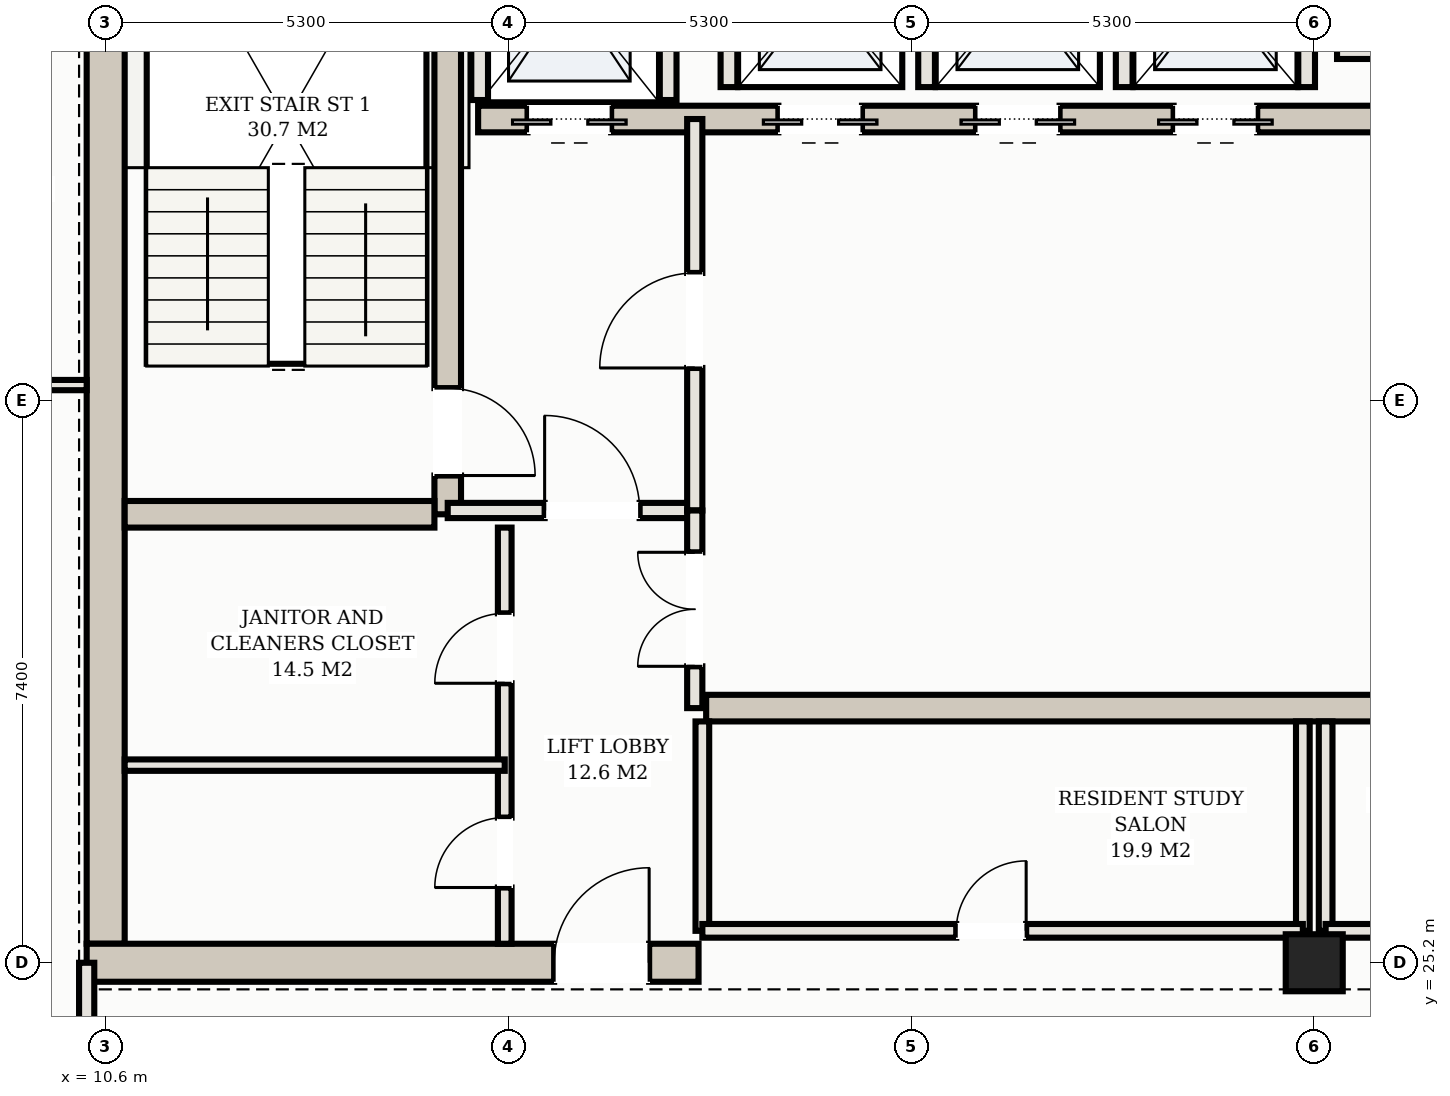
"""IFC4 building model, lengths in metres.
Left out: names, types, materials, properties, quantities, classifications, styles, units other than length and angle.
Written with IfcOpenShell. Run it as: python <this file> out.ifc"""

import sys

from ifc_helpers import new_model, si_unit, direction, frame, frame_2d, origin, origin_2d, place, context, subcontext, project, spatial, rectangle, hollow_rectangle, extrude, element, fill, save


model = new_model("IFC4")
c1 = context("Model", 3, precision=1e-05, world=origin(), true_north=direction((0.0, 1.0)))
c2 = subcontext(c1, "Body", "Model", "MODEL_VIEW")
j1 = project(units=[si_unit("LENGTHUNIT", "METRE"), si_unit("PLANEANGLEUNIT", "RADIAN")], contexts=[c1])
p1 = place(None, origin())
s1 = spatial("IfcSite", under=j1, at=p1, CompositionType="ELEMENT")
p2 = place(p1, origin())
s2 = spatial("IfcBuilding", under=s1, at=p2, CompositionType="ELEMENT")
p3 = place(p2, frame((0.0, 0.0, 219.8)))
s3 = spatial("IfcBuildingStorey", under=s2, at=p3, CompositionType="ELEMENT", Elevation=219.8)
p4 = place(p3, frame((10.6, 25.45, 0.0), z_axis=(0.0, 0.0, 1.0), x_axis=(0.0, 1.0, 0.0)))
e1 = element("IfcWall", 1, at=p4, inside=s3, PredefinedType="SHEAR", context=c2, shape_type="SweptSolid", body=[
    extrude(rectangle(XDim=14.3, YDim=0.5, at=frame_2d((7.15, 0.0))), origin(), (0.0, 0.0, 1.0), 3.11),
])
p5 = place(p3, frame((10.35, 25.2, 0.0), z_axis=(0.0, 0.0, 1.0), x_axis=(1.0, 0.0, 0.0)))
e2 = element("IfcWall", 2, at=p5, inside=s3, PredefinedType="SHEAR", context=c2, shape_type="SweptSolid", body=[
    extrude(rectangle(XDim=8.05, YDim=0.5, at=frame_2d((4.025, 0.0))), origin(), (0.0, 0.0, 1.0), 3.11),
])
p6 = place(p5, frame((6.15, 0.0, 0.0)))
e3 = element("IfcOpeningElement", 3, at=p6, cuts=e2, PredefinedType="OPENING", context=c2, shape_type="SweptSolid", body=[
    extrude(rectangle(XDim=1.25, YDim=2.2, at=frame_2d((0.625, 1.1))), frame((0.0, 0.26, 0.0), z_axis=(0.0, -1.0, 0.0), x_axis=(1.0, 0.0, 0.0)), (0.0, 0.0, 1.0), 0.52),
])
p7 = place(p3, frame((15.1, 31.1, 0.0), z_axis=(0.0, 0.0, 1.0), x_axis=(0.0, 1.0, 0.0)))
e4 = element("IfcWall", 4, at=p7, inside=s3, PredefinedType="SHEAR", context=c2, shape_type="SweptSolid", body=[
    extrude(rectangle(XDim=8.65, YDim=0.35, at=frame_2d((4.325, 0.0))), origin(), (0.0, 0.0, 1.0), 3.11),
])
p8 = place(p7, frame((0.51, 0.0, 0.0)))
e5 = element("IfcOpeningElement", 5, at=p8, cuts=e4, PredefinedType="OPENING", context=c2, shape_type="SweptSolid", body=[
    extrude(rectangle(XDim=1.15, YDim=2.2, at=frame_2d((0.575, 1.1))), frame((0.0, 0.185, 0.0), z_axis=(0.0, -1.0, 0.0), x_axis=(1.0, 0.0, 0.0)), (0.0, 0.0, 1.0), 0.37),
])
p9 = place(p3, frame((10.85, 31.1, 0.0), z_axis=(0.0, 0.0, 1.0), x_axis=(1.0, 0.0, 0.0)))
e6 = element("IfcWall", 6, at=p9, inside=s3, PredefinedType="SHEAR", context=c2, shape_type="SweptSolid", body=[
    extrude(rectangle(XDim=4.075, YDim=0.35, at=frame_2d((2.038, 0.0))), origin(), (0.0, 0.0, 1.0), 3.11),
])
p10 = place(p3, frame((15.5, 36.3, 0.0), z_axis=(0.0, 0.0, 1.0), x_axis=(1.0, 0.0, 0.0)))
e7 = element("IfcWall", 7, at=p10, inside=s3, PredefinedType="SHEAR", context=c2, shape_type="SweptSolid", body=[
    extrude(rectangle(XDim=22.0, YDim=0.35, at=frame_2d((11.0, 0.0))), origin(), (0.0, 0.0, 1.0), 3.11),
])
p11 = place(p10, frame((0.65, 0.0, 0.0)))
e8 = element("IfcOpeningElement", 8, at=p11, cuts=e7, PredefinedType="OPENING", context=c2, shape_type="SweptSolid", body=[
    extrude(rectangle(XDim=1.1, YDim=2.15, at=frame_2d((0.55, 1.075))), frame((0.0, 0.185, 0.0), z_axis=(0.0, -1.0, 0.0), x_axis=(1.0, 0.0, 0.0)), (0.0, 0.0, 1.0), 0.37),
])
p12 = place(p10, frame((20.25, 0.0, 0.0)))
e9 = element("IfcOpeningElement", 9, at=p12, cuts=e7, PredefinedType="OPENING", context=c2, shape_type="SweptSolid", body=[
    extrude(rectangle(XDim=1.1, YDim=2.15, at=frame_2d((0.55, 1.075))), frame((0.0, 0.185, 0.0), z_axis=(0.0, -1.0, 0.0), x_axis=(1.0, 0.0, 0.0)), (0.0, 0.0, 1.0), 0.37),
])
p13 = place(p10, frame((17.05, 0.0, 0.0)))
e10 = element("IfcOpeningElement", 10, at=p13, cuts=e7, PredefinedType="OPENING", context=c2, shape_type="SweptSolid", body=[
    extrude(rectangle(XDim=1.3, YDim=2.2, at=frame_2d((0.65, 1.1))), frame((0.0, 0.185, 0.0), z_axis=(0.0, -1.0, 0.0), x_axis=(1.0, 0.0, 0.0)), (0.0, 0.0, 1.0), 0.37),
])
p14 = place(p10, frame((3.95, 0.0, 0.0)))
e11 = element("IfcOpeningElement", 11, at=p14, cuts=e7, PredefinedType="OPENING", context=c2, shape_type="SweptSolid", body=[
    extrude(rectangle(XDim=1.1, YDim=2.15, at=frame_2d((0.55, 1.075))), frame((0.0, 0.185, 0.0), z_axis=(0.0, -1.0, 0.0), x_axis=(1.0, 0.0, 0.0)), (0.0, 0.0, 1.0), 0.37),
])
p15 = place(p10, frame((6.55, 0.0, 0.0)))
e12 = element("IfcOpeningElement", 12, at=p15, cuts=e7, PredefinedType="OPENING", context=c2, shape_type="SweptSolid", body=[
    extrude(rectangle(XDim=1.1, YDim=2.15, at=frame_2d((0.55, 1.075))), frame((0.0, 0.185, 0.0), z_axis=(0.0, -1.0, 0.0), x_axis=(1.0, 0.0, 0.0)), (0.0, 0.0, 1.0), 0.37),
])
p16 = place(p10, frame((9.15, 0.0, 0.0)))
e13 = element("IfcOpeningElement", 13, at=p16, cuts=e7, PredefinedType="OPENING", context=c2, shape_type="SweptSolid", body=[
    extrude(rectangle(XDim=1.1, YDim=2.15, at=frame_2d((0.55, 1.075))), frame((0.0, 0.185, 0.0), z_axis=(0.0, -1.0, 0.0), x_axis=(1.0, 0.0, 0.0)), (0.0, 0.0, 1.0), 0.37),
])
p17 = place(p3, frame((18.5, 28.55, 0.0), z_axis=(0.0, 0.0, 1.0), x_axis=(1.0, 0.0, 0.0)))
e14 = element("IfcWall", 14, at=p17, inside=s3, PredefinedType="SHEAR", context=c2, shape_type="SweptSolid", body=[
    extrude(rectangle(XDim=16.0, YDim=0.35, at=frame_2d((8.0, 0.0))), origin(), (0.0, 0.0, 1.0), 3.11),
])
p18 = place(p3, frame((26.5, 25.2, 0.0), z_axis=(0.0, 0.0, 1.0), x_axis=(1.0, 0.0, 0.0)))
e15 = element("IfcColumn", 15, at=p18, inside=s3, PredefinedType="COLUMN", context=c2, shape_type="SweptSolid", body=[
    extrude(hollow_rectangle(XDim=0.75, YDim=0.75, WallThickness=0.025, at=origin_2d()), origin(), (0.0, 0.0, 1.0), 3.3),
])
for number, where, z_axis, x_axis in (
    (16, (15.52, 36.55, 0.0), (0.0, 0.0, 1.0), (0.0, 1.0, 0.0)),
    (17, (18.0, 36.55, 0.0), (0.0, 0.0, 1.0), (0.0, 1.0, 0.0)),
):
    element("IfcWall", number, at=place(p3, frame(where, z_axis=z_axis, x_axis=x_axis)), inside=s3, PredefinedType="SOLIDWALL", context=c2, shape_type="SweptSolid", body=[
        extrude(rectangle(XDim=2.93, YDim=0.22, at=frame_2d((1.465, 0.0))), origin(), (0.0, 0.0, 1.0), 3.11),
    ])
for number, where, z_axis, x_axis in (
    (18, (18.8, 36.72, 0.0), (0.0, 0.0, 1.0), (0.0, 1.0, 0.0)),
    (19, (21.4, 36.72, 0.0), (0.0, 0.0, 1.0), (0.0, 1.0, 0.0)),
    (20, (24.0, 36.72, 0.0), (0.0, 0.0, 1.0), (0.0, 1.0, 0.0)),
    (21, (26.4, 36.72, 0.0), (0.0, 0.0, 1.0), (0.0, 1.0, 0.0)),
):
    element("IfcWall", number, at=place(p3, frame(where, z_axis=z_axis, x_axis=x_axis)), inside=s3, PredefinedType="SOLIDWALL", context=c2, shape_type="SweptSolid", body=[
        extrude(rectangle(XDim=2.56, YDim=0.22, at=frame_2d((1.28, 0.0))), origin(), (0.0, 0.0, 1.0), 3.11),
    ])
p19 = place(p3, frame((26.8, 37.2, 0.0), z_axis=(0.0, 0.0, 1.0), x_axis=(1.0, 0.0, 0.0)))
e22 = element("IfcWall", 22, at=p19, inside=s3, PredefinedType="SOLIDWALL", context=c2, shape_type="SweptSolid", body=[
    extrude(rectangle(XDim=2.2, YDim=0.22, at=frame_2d((1.1, 0.0))), origin(), (0.0, 0.0, 1.0), 3.11),
])
p20 = place(p3, frame((15.1, 31.15, 0.0), z_axis=(0.0, 0.0, 1.0), x_axis=(1.0, 0.0, 0.0)))
e23 = element("IfcWall", 23, at=p20, inside=s3, PredefinedType="PARTITIONING", context=c2, shape_type="SweptSolid", body=[
    extrude(rectangle(XDim=3.25, YDim=0.2, at=frame_2d((1.625, 0.0))), origin(), (0.0, 0.0, 1.0), 2.43),
])
p21 = place(p20, frame((1.275, 0.0, 0.0)))
e24 = element("IfcOpeningElement", 24, at=p21, cuts=e23, PredefinedType="OPENING", context=c2, shape_type="SweptSolid", body=[
    extrude(rectangle(XDim=1.25, YDim=2.2, at=frame_2d((0.625, 1.1))), frame((0.0, 0.11, 0.0), z_axis=(0.0, -1.0, 0.0), x_axis=(1.0, 0.0, 0.0)), (0.0, 0.0, 1.0), 0.22),
])
p22 = place(p3, frame((18.35, 31.15, 0.0), z_axis=(0.0, 0.0, 1.0), x_axis=(0.0, 1.0, 0.0)))
e25 = element("IfcWall", 25, at=p22, inside=s3, PredefinedType="PARTITIONING", context=c2, shape_type="SweptSolid", body=[
    extrude(rectangle(XDim=5.15, YDim=0.2, at=frame_2d((2.575, 0.0))), origin(), (0.0, 0.0, 1.0), 2.43),
])
p23 = place(p22, frame((1.875, 0.0, 0.0)))
e26 = element("IfcOpeningElement", 26, at=p23, cuts=e25, PredefinedType="OPENING", context=c2, shape_type="SweptSolid", body=[
    extrude(rectangle(XDim=1.25, YDim=2.2, at=frame_2d((0.625, 1.1))), frame((0.0, 0.11, 0.0), z_axis=(0.0, -1.0, 0.0), x_axis=(1.0, 0.0, 0.0)), (0.0, 0.0, 1.0), 0.22),
])
p24 = place(p3, frame((15.85, 25.45, 0.0), z_axis=(0.0, 0.0, 1.0), x_axis=(0.0, 1.0, 0.0)))
e27 = element("IfcWall", 27, at=p24, inside=s3, PredefinedType="PARTITIONING", context=c2, shape_type="SweptSolid", body=[
    extrude(rectangle(XDim=5.475, YDim=0.18, at=frame_2d((2.738, 0.0))), origin(), (0.0, 0.0, 1.0), 2.43),
])
p25 = place(p24, frame((0.74, 0.0, 0.0)))
e28 = element("IfcOpeningElement", 28, at=p25, cuts=e27, PredefinedType="OPENING", context=c2, shape_type="SweptSolid", body=[
    extrude(rectangle(XDim=0.92, YDim=2.15, at=frame_2d((0.46, 1.075))), frame((0.0, 0.1, 0.0), z_axis=(0.0, -1.0, 0.0), x_axis=(1.0, 0.0, 0.0)), (0.0, 0.0, 1.0), 0.2),
])
p26 = place(p24, frame((3.427, 0.0, 0.0)))
e29 = element("IfcOpeningElement", 29, at=p26, cuts=e27, PredefinedType="OPENING", context=c2, shape_type="SweptSolid", body=[
    extrude(rectangle(XDim=0.92, YDim=2.15, at=frame_2d((0.46, 1.075))), frame((0.0, 0.1, 0.0), z_axis=(0.0, -1.0, 0.0), x_axis=(1.0, 0.0, 0.0)), (0.0, 0.0, 1.0), 0.2),
])
p27 = place(p3, frame((10.85, 27.8, 0.0), z_axis=(0.0, 0.0, 1.0), x_axis=(1.0, 0.0, 0.0)))
e30 = element("IfcWall", 30, at=p27, inside=s3, PredefinedType="PARTITIONING", context=c2, shape_type="SweptSolid", body=[
    extrude(rectangle(XDim=5.0, YDim=0.15, at=frame_2d((2.5, 0.0))), origin(), (0.0, 0.0, 1.0), 2.43),
])
p28 = place(p3, frame((18.35, 28.55, 0.0), z_axis=(0.0, 0.0, 1.0), x_axis=(0.0, 1.0, 0.0)))
e31 = element("IfcWall", 31, at=p28, inside=s3, PredefinedType="PARTITIONING", context=c2, shape_type="SweptSolid", body=[
    extrude(rectangle(XDim=2.6, YDim=0.2, at=frame_2d((1.3, 0.0))), origin(), (0.0, 0.0, 1.0), 2.43),
])
p29 = place(p28, frame((0.55, 0.0, 0.0)))
e32 = element("IfcOpeningElement", 32, at=p29, cuts=e31, PredefinedType="OPENING", context=c2, shape_type="SweptSolid", body=[
    extrude(rectangle(XDim=1.5, YDim=2.25, at=frame_2d((0.75, 1.125))), frame((0.0, 0.11, 0.0), z_axis=(0.0, -1.0, 0.0), x_axis=(1.0, 0.0, 0.0)), (0.0, 0.0, 1.0), 0.22),
])
for number, where, z_axis, x_axis in (
    (33, (18.45, 25.62, 0.0), (0.0, 0.0, 1.0), (0.0, 1.0, 0.0)),
    (34, (26.35, 25.62, 0.0), (0.0, 0.0, 1.0), (0.0, 1.0, 0.0)),
):
    element("IfcWall", number, at=place(p3, frame(where, z_axis=z_axis, x_axis=x_axis)), inside=s3, PredefinedType="PARTITIONING", context=c2, shape_type="SweptSolid", body=[
        extrude(rectangle(XDim=2.755, YDim=0.18, at=frame_2d((1.377, 0.0))), origin(), (0.0, 0.0, 1.0), 2.43),
    ])
p30 = place(p3, frame((18.45, 25.62, 0.0), z_axis=(0.0, 0.0, 1.0), x_axis=(1.0, 0.0, 0.0)))
e35 = element("IfcWall", 35, at=p30, inside=s3, PredefinedType="PARTITIONING", context=c2, shape_type="SweptSolid", body=[
    extrude(rectangle(XDim=7.9, YDim=0.18, at=frame_2d((3.95, 0.0))), origin(), (0.0, 0.0, 1.0), 2.43),
])
p31 = place(p30, frame((3.34, 0.0, 0.0)))
e36 = element("IfcOpeningElement", 36, at=p31, cuts=e35, PredefinedType="OPENING", context=c2, shape_type="SweptSolid", body=[
    extrude(rectangle(XDim=0.92, YDim=2.15, at=frame_2d((0.46, 1.075))), frame((0.0, 0.1, 0.0), z_axis=(0.0, -1.0, 0.0), x_axis=(1.0, 0.0, 0.0)), (0.0, 0.0, 1.0), 0.2),
])
p32 = place(p3, frame((26.65, 25.62, 0.0), z_axis=(0.0, 0.0, 1.0), x_axis=(0.0, 1.0, 0.0)))
e37 = element("IfcWall", 37, at=p32, inside=s3, PredefinedType="PARTITIONING", context=c2, shape_type="SweptSolid", body=[
    extrude(rectangle(XDim=2.755, YDim=0.18, at=frame_2d((1.377, 0.0))), origin(), (0.0, 0.0, 1.0), 2.43),
])
p33 = place(p3, frame((26.65, 25.62, 0.0), z_axis=(0.0, 0.0, 1.0), x_axis=(1.0, 0.0, 0.0)))
e38 = element("IfcWall", 38, at=p33, inside=s3, PredefinedType="PARTITIONING", context=c2, shape_type="SweptSolid", body=[
    extrude(rectangle(XDim=7.9, YDim=0.18, at=frame_2d((3.95, 0.0))), origin(), (0.0, 0.0, 1.0), 2.43),
])
p34 = place(p33, frame((3.34, 0.0, 0.0)))
e39 = element("IfcOpeningElement", 39, at=p34, cuts=e38, PredefinedType="OPENING", context=c2, shape_type="SweptSolid", body=[
    extrude(rectangle(XDim=0.92, YDim=2.15, at=frame_2d((0.46, 1.075))), frame((0.0, 0.1, 0.0), z_axis=(0.0, -1.0, 0.0), x_axis=(1.0, 0.0, 0.0)), (0.0, 0.0, 1.0), 0.2),
])
p35 = place(p3, frame((10.35, 23.75, 0.0), z_axis=(0.0, 0.0, 1.0), x_axis=(0.0, 1.0, 0.0)))
e40 = element("IfcWall", 40, at=p35, inside=s3, PredefinedType="PARTITIONING", context=c2, shape_type="SweptSolid", body=[
    extrude(rectangle(XDim=1.45, YDim=0.2, at=frame_2d((0.725, 0.0))), origin(), (0.0, 0.0, 1.0), 2.43),
])
p36 = place(p3, frame((6.72, 32.8, 0.0), z_axis=(0.0, 0.0, 1.0), x_axis=(1.0, 0.0, 0.0)))
e41 = element("IfcWall", 41, at=p36, inside=s3, PredefinedType="PARTITIONING", context=c2, shape_type="SweptSolid", body=[
    extrude(rectangle(XDim=3.63, YDim=0.135, at=frame_2d((1.815, 0.0))), origin(), (0.0, 0.0, 1.0), 2.43),
])
p37 = place(p36, frame((1.355, 0.0, 0.0)))
e42 = element("IfcOpeningElement", 42, at=p37, cuts=e41, PredefinedType="OPENING", context=c2, shape_type="SweptSolid", body=[
    extrude(rectangle(XDim=0.92, YDim=2.15, at=frame_2d((0.46, 1.075))), frame((0.0, 0.078, 0.0), z_axis=(0.0, -1.0, 0.0), x_axis=(1.0, 0.0, 0.0)), (0.0, 0.0, 1.0), 0.155),
])
p38 = place(p11, frame((1.1, 0.0, 0.0), z_axis=(0.0, 0.0, 1.0), x_axis=(-1.0, 0.0, 0.0)))
e43 = element("IfcDoor", 43, at=p38, inside=s3, OperationType="DOUBLE_DOOR_SLIDING", PredefinedType="DOOR", context=c2, shape_type="SweptSolid", body=[
    extrude(rectangle(XDim=1.1, YDim=2.15, at=frame_2d((0.55, 1.075))), frame((0.0, 0.025, 0.0), z_axis=(0.0, -1.0, 0.0), x_axis=(1.0, 0.0, 0.0)), (0.0, 0.0, 1.0), 0.05),
])
fill(e8, e43)
p39 = place(p14, frame((1.1, 0.0, 0.0), z_axis=(0.0, 0.0, 1.0), x_axis=(-1.0, 0.0, 0.0)))
e44 = element("IfcDoor", 44, at=p39, inside=s3, OperationType="DOUBLE_DOOR_SLIDING", PredefinedType="DOOR", context=c2, shape_type="SweptSolid", body=[
    extrude(rectangle(XDim=1.1, YDim=2.15, at=frame_2d((0.55, 1.075))), frame((0.0, 0.025, 0.0), z_axis=(0.0, -1.0, 0.0), x_axis=(1.0, 0.0, 0.0)), (0.0, 0.0, 1.0), 0.05),
])
fill(e11, e44)
p40 = place(p15, frame((1.1, 0.0, 0.0), z_axis=(0.0, 0.0, 1.0), x_axis=(-1.0, 0.0, 0.0)))
e45 = element("IfcDoor", 45, at=p40, inside=s3, OperationType="DOUBLE_DOOR_SLIDING", PredefinedType="DOOR", context=c2, shape_type="SweptSolid", body=[
    extrude(rectangle(XDim=1.1, YDim=2.15, at=frame_2d((0.55, 1.075))), frame((0.0, 0.025, 0.0), z_axis=(0.0, -1.0, 0.0), x_axis=(1.0, 0.0, 0.0)), (0.0, 0.0, 1.0), 0.05),
])
fill(e12, e45)
p41 = place(p16, frame((1.1, 0.0, 0.0), z_axis=(0.0, 0.0, 1.0), x_axis=(-1.0, 0.0, 0.0)))
e46 = element("IfcDoor", 46, at=p41, inside=s3, OperationType="DOUBLE_DOOR_SLIDING", PredefinedType="DOOR", context=c2, shape_type="SweptSolid", body=[
    extrude(rectangle(XDim=1.1, YDim=2.15, at=frame_2d((0.55, 1.075))), frame((0.0, 0.025, 0.0), z_axis=(0.0, -1.0, 0.0), x_axis=(1.0, 0.0, 0.0)), (0.0, 0.0, 1.0), 0.05),
])
fill(e13, e46)
p42 = place(p6, origin())
e47 = element("IfcDoor", 47, at=p42, inside=s3, OperationType="SINGLE_SWING_RIGHT", PredefinedType="DOOR", context=c2, shape_type="SweptSolid", body=[
    extrude(rectangle(XDim=1.25, YDim=2.2, at=frame_2d((0.625, 1.1))), frame((0.0, 0.025, 0.0), z_axis=(0.0, -1.0, 0.0), x_axis=(1.0, 0.0, 0.0)), (0.0, 0.0, 1.0), 0.05),
])
fill(e3, e47)
p43 = place(p21, origin())
e48 = element("IfcDoor", 48, at=p43, inside=s3, OperationType="SINGLE_SWING_LEFT", PredefinedType="DOOR", context=c2, shape_type="SweptSolid", body=[
    extrude(rectangle(XDim=1.25, YDim=2.2, at=frame_2d((0.625, 1.1))), frame((0.0, 0.025, 0.0), z_axis=(0.0, -1.0, 0.0), x_axis=(1.0, 0.0, 0.0)), (0.0, 0.0, 1.0), 0.05),
])
fill(e24, e48)
p44 = place(p23, origin())
e49 = element("IfcDoor", 49, at=p44, inside=s3, OperationType="SINGLE_SWING_LEFT", PredefinedType="DOOR", context=c2, shape_type="SweptSolid", body=[
    extrude(rectangle(XDim=1.25, YDim=2.2, at=frame_2d((0.625, 1.1))), frame((0.0, 0.025, 0.0), z_axis=(0.0, -1.0, 0.0), x_axis=(1.0, 0.0, 0.0)), (0.0, 0.0, 1.0), 0.05),
])
fill(e26, e49)
p45 = place(p8, frame((1.15, 0.0, 0.0), z_axis=(0.0, 0.0, 1.0), x_axis=(-1.0, 0.0, 0.0)))
e50 = element("IfcDoor", 50, at=p45, inside=s3, OperationType="SINGLE_SWING_RIGHT", PredefinedType="DOOR", context=c2, shape_type="SweptSolid", body=[
    extrude(rectangle(XDim=1.15, YDim=2.2, at=frame_2d((0.575, 1.1))), frame((0.0, 0.025, 0.0), z_axis=(0.0, -1.0, 0.0), x_axis=(1.0, 0.0, 0.0)), (0.0, 0.0, 1.0), 0.05),
])
fill(e5, e50)
p46 = place(p25, origin())
e51 = element("IfcDoor", 51, at=p46, inside=s3, OperationType="SINGLE_SWING_LEFT", PredefinedType="DOOR", context=c2, shape_type="SweptSolid", body=[
    extrude(rectangle(XDim=0.92, YDim=2.15, at=frame_2d((0.46, 1.075))), frame((0.0, 0.025, 0.0), z_axis=(0.0, -1.0, 0.0), x_axis=(1.0, 0.0, 0.0)), (0.0, 0.0, 1.0), 0.05),
])
fill(e28, e51)
p47 = place(p26, origin())
e52 = element("IfcDoor", 52, at=p47, inside=s3, OperationType="SINGLE_SWING_LEFT", PredefinedType="DOOR", context=c2, shape_type="SweptSolid", body=[
    extrude(rectangle(XDim=0.92, YDim=2.15, at=frame_2d((0.46, 1.075))), frame((0.0, 0.025, 0.0), z_axis=(0.0, -1.0, 0.0), x_axis=(1.0, 0.0, 0.0)), (0.0, 0.0, 1.0), 0.05),
])
fill(e29, e52)
p48 = place(p29, origin())
e53 = element("IfcDoor", 53, at=p48, inside=s3, OperationType="DOUBLE_DOOR_SINGLE_SWING", PredefinedType="DOOR", context=c2, shape_type="SweptSolid", body=[
    extrude(rectangle(XDim=1.5, YDim=2.25, at=frame_2d((0.75, 1.125))), frame((0.0, 0.025, 0.0), z_axis=(0.0, -1.0, 0.0), x_axis=(1.0, 0.0, 0.0)), (0.0, 0.0, 1.0), 0.05),
])
fill(e32, e53)
p49 = place(p31, origin())
e54 = element("IfcDoor", 54, at=p49, inside=s3, OperationType="SINGLE_SWING_RIGHT", PredefinedType="DOOR", context=c2, shape_type="SweptSolid", body=[
    extrude(rectangle(XDim=0.92, YDim=2.15, at=frame_2d((0.46, 1.075))), frame((0.0, 0.025, 0.0), z_axis=(0.0, -1.0, 0.0), x_axis=(1.0, 0.0, 0.0)), (0.0, 0.0, 1.0), 0.05),
])
fill(e36, e54)
save(model, sys.argv[1])
